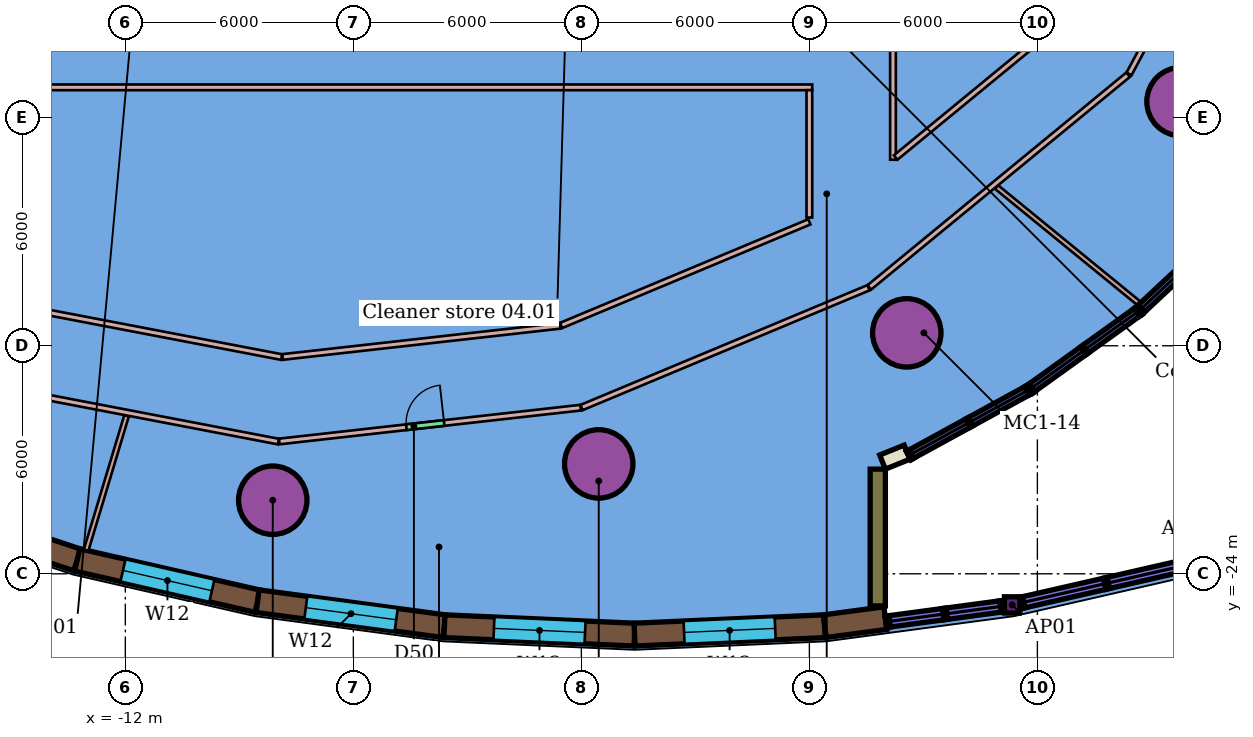
"""IFC4 building model, lengths in metres.
Left out: names, types, materials, properties, quantities, classifications, styles, units other than length and angle.
Written with IfcOpenShell. Run it as: python <this file> out.ifc"""

import sys

from ifc_helpers import new_model, si_unit, direction, frame, frame_2d, origin, origin_2d, place, context, subcontext, project, spatial, rectangle, hollow_circle, i_section, extrude, element, fill, save


model = new_model("IFC4")
c1 = context("Model", 3, precision=1e-05, world=origin(), true_north=direction((0.0, 1.0)))
c2 = subcontext(c1, "Body", "Model", "MODEL_VIEW")
j1 = project(units=[si_unit("LENGTHUNIT", "METRE"), si_unit("PLANEANGLEUNIT", "RADIAN")], contexts=[c1])
p1 = place(None, origin())
s1 = spatial("IfcSite", under=j1, at=p1, CompositionType="ELEMENT")
p2 = place(p1, origin())
s2 = spatial("IfcBuilding", under=s1, at=p2, CompositionType="ELEMENT")
p3 = place(p2, frame((0.0, 0.0, 31.5)))
s3 = spatial("IfcBuildingStorey", under=s2, at=p3, CompositionType="ELEMENT", Elevation=31.5)
for number, where, z_axis, x_axis in (
    (1, (-8.121, -22.064, 0.0), (0.0, 0.0, 1.0), (1.0, 0.0, 0.0)),
    (2, (0.458, -21.108, 0.0), (0.0, 0.0, 1.0), (1.0, 0.0, 0.0)),
    (3, (8.563, -17.66, 0.0), (0.0, 0.0, 1.0), (1.0, 0.0, 0.0)),
    (4, (15.78, -11.576, 0.0), (0.0, 0.0, 1.0), (1.0, 0.0, 0.0)),
):
    element("IfcColumn", number, at=place(p3, frame(where, z_axis=z_axis, x_axis=x_axis)), inside=s3, PredefinedType="COLUMN", context=c2, shape_type="SweptSolid", body=[
        extrude(hollow_circle(Radius=0.9, WallThickness=0.06, at=origin_2d()), origin(), (0.0, 0.0, 1.0), 4.35),
    ])
p4 = place(p3, frame((11.337, -24.819, 0.0), z_axis=(0.0, 0.0, 1.0), x_axis=(1.0, 0.0, 0.0)))
e5 = element("IfcColumn", 5, at=p4, inside=s3, PredefinedType="COLUMN", context=c2, shape_type="SweptSolid", body=[
    extrude(i_section(OverallWidth=0.407, OverallDepth=0.428, WebThickness=0.02, FlangeThickness=0.035, at=origin_2d()), origin(), (0.0, 0.0, 1.0), 4.35),
])
p5 = place(p3, frame((8.2, -13.105, 0.0), z_axis=(0.0, 0.0, 1.0), x_axis=(0.0, 1.0, 0.0)))
e6 = element("IfcWall", 6, at=p5, inside=s3, PredefinedType="PARTITIONING", context=c2, shape_type="SweptSolid", body=[
    extrude(rectangle(XDim=24.23, YDim=0.15, at=frame_2d((12.115, 0.0))), origin(), (0.0, 0.0, 1.0), 3.9),
])
p6 = place(p3, frame((-20.275, -11.2, 0.0), z_axis=(0.0, 0.0, 1.0), x_axis=(1.0, 0.0, 0.0)))
e7 = element("IfcWall", 7, at=p6, inside=s3, PredefinedType="PARTITIONING", context=c2, shape_type="SweptSolid", body=[
    extrude(rectangle(XDim=26.35, YDim=0.15, at=frame_2d((13.175, 0.0))), origin(), (0.0, 0.0, 1.0), 3.9),
])
p7 = place(p3, frame((6.0, -14.626, 0.0), z_axis=(0.0, 0.0, 1.0), x_axis=(0.0, 1.0, 0.0)))
e8 = element("IfcWall", 8, at=p7, inside=s3, PredefinedType="PARTITIONING", context=c2, shape_type="SweptSolid", body=[
    extrude(rectangle(XDim=3.351, YDim=0.15, at=frame_2d((1.676, 0.0))), origin(), (0.0, 0.0, 1.0), 3.9),
])
p8 = place(p3, frame((8.271, -13.047, 0.0), z_axis=(0.0, 0.0, 1.0), x_axis=(0.772561089928, 0.634940439986, 0.0)))
e9 = element("IfcWall", 9, at=p8, inside=s3, PredefinedType="PARTITIONING", context=c2, shape_type="SweptSolid", body=[
    extrude(rectangle(XDim=5.672, YDim=0.15, at=frame_2d((2.836, 0.0))), origin(), (0.0, 0.0, 1.0), 3.9),
])
p9 = place(p3, frame((-15.325, -16.875, 0.0), z_axis=(0.0, 0.0, 1.0), x_axis=(0.982205706766, -0.187808278828, 0.0)))
e10 = element("IfcWall", 10, at=p9, inside=s3, PredefinedType="PARTITIONING", context=c2, shape_type="SweptSolid", body=[
    extrude(rectangle(XDim=7.573, YDim=0.15, at=frame_2d((3.787, 0.0))), origin(), (0.0, 0.0, 1.0), 3.9),
])
p10 = place(p3, frame((-0.533, -17.466, 0.0), z_axis=(0.0, 0.0, 1.0), x_axis=(0.9228124679, 0.38524946345, 0.0)))
e11 = element("IfcWall", 11, at=p10, inside=s3, PredefinedType="PARTITIONING", context=c2, shape_type="SweptSolid", body=[
    extrude(rectangle(XDim=7.08, YDim=0.15, at=frame_2d((3.54, 0.0))), origin(), (0.0, 0.0, 1.0), 3.9),
])
p11 = place(p3, frame((-7.863, -18.295, 0.0), z_axis=(0.0, 0.0, 1.0), x_axis=(0.993762113274, 0.111520680692, 0.0)))
e12 = element("IfcWall", 12, at=p11, inside=s3, PredefinedType="PARTITIONING", context=c2, shape_type="SweptSolid", body=[
    extrude(rectangle(XDim=7.356, YDim=0.15, at=frame_2d((3.678, 0.0))), origin(), (0.0, 0.0, 1.0), 3.9),
])
p12 = place(p3, frame((-13.032, -23.381, 0.0), z_axis=(0.0, 0.0, 1.0), x_axis=(0.288062560414, 0.957611592081, 0.0)))
e13 = element("IfcWall", 13, at=p12, inside=s3, PredefinedType="PARTITIONING", context=c2, shape_type="SweptSolid", body=[
    extrude(rectangle(XDim=3.698, YDim=0.125, at=frame_2d((1.849, 0.0))), origin(), (0.0, 0.0, 1.0), 3.9),
])
p13 = place(p3, frame((-16.06, -18.975, 0.0), z_axis=(0.0, 0.0, 1.0), x_axis=(0.982207009241, -0.187801466976, 0.0)))
e14 = element("IfcWall", 14, at=p13, inside=s3, PredefinedType="PARTITIONING", context=c2, shape_type="SweptSolid", body=[
    extrude(rectangle(XDim=8.234, YDim=0.15, at=frame_2d((4.117, 0.0))), origin(), (0.0, 0.0, 1.0), 3.9),
])
p14 = place(p3, frame((10.927, -13.825, 0.0), z_axis=(0.0, 0.0, 1.0), x_axis=(0.774480098596, -0.632598274483, 0.0)))
e15 = element("IfcWall", 15, at=p14, inside=s3, PredefinedType="PARTITIONING", context=c2, shape_type="SweptSolid", body=[
    extrude(rectangle(XDim=4.866, YDim=0.125, at=frame_2d((2.433, 0.0))), origin(), (0.0, 0.0, 1.0), 3.9),
])
p15 = place(p3, frame((-7.949, -20.518, 0.0), z_axis=(0.0, 0.0, 1.0), x_axis=(0.993764533241, 0.11149911422, 0.0)))
e16 = element("IfcWall", 16, at=p15, inside=s3, PredefinedType="PARTITIONING", context=c2, shape_type="SweptSolid", body=[
    extrude(rectangle(XDim=7.981, YDim=0.15, at=frame_2d((3.991, 0.0))), origin(), (0.0, 0.0, 1.0), 3.9),
])
p16 = place(p15, frame((3.365, 0.0, 0.0)))
e17 = element("IfcOpeningElement", 17, at=p16, cuts=e16, PredefinedType="OPENING", context=c2, shape_type="SweptSolid", body=[
    extrude(rectangle(XDim=1.0, YDim=2.1, at=frame_2d((0.5, 1.05))), frame((0.0, 0.085, 0.0), z_axis=(0.0, -1.0, 0.0), x_axis=(1.0, 0.0, 0.0)), (0.0, 0.0, 1.0), 0.17),
])
p17 = place(p3, frame((0.004, -19.626, 0.0), z_axis=(0.0, 0.0, 1.0), x_axis=(0.922818121352, 0.385235921097, 0.0)))
e18 = element("IfcWall", 18, at=p17, inside=s3, PredefinedType="PARTITIONING", context=c2, shape_type="SweptSolid", body=[
    extrude(rectangle(XDim=8.184, YDim=0.15, at=frame_2d((4.092, 0.0))), origin(), (0.0, 0.0, 1.0), 3.9),
])
p18 = place(p3, frame((7.577, -16.465, 0.0), z_axis=(0.0, 0.0, 1.0), x_axis=(0.772575830308, 0.634922504266, 0.0)))
e19 = element("IfcWall", 19, at=p18, inside=s3, PredefinedType="PARTITIONING", context=c2, shape_type="SweptSolid", body=[
    extrude(rectangle(XDim=8.815, YDim=0.15, at=frame_2d((4.407, 0.0))), origin(), (0.0, 0.0, 1.0), 3.9),
])
p19 = place(p3, frame((14.411, -10.848, 0.0), z_axis=(0.0, 0.0, 1.0), x_axis=(0.470742429837, 0.88227068678, 0.0)))
e20 = element("IfcWall", 20, at=p19, inside=s3, PredefinedType="PARTITIONING", context=c2, shape_type="SweptSolid", body=[
    extrude(rectangle(XDim=9.532, YDim=0.15, at=frame_2d((4.766, 0.0))), origin(), (0.0, 0.0, 1.0), 3.9),
])
p20 = place(p19, frame((4.14, 0.0, 0.0)))
e21 = element("IfcOpeningElement", 21, at=p20, cuts=e20, PredefinedType="OPENING", context=c2, shape_type="SweptSolid", body=[
    extrude(rectangle(XDim=1.0, YDim=2.1, at=frame_2d((0.5, 1.05))), frame((0.0, 0.085, 0.0), z_axis=(0.0, -1.0, 0.0), x_axis=(1.0, 0.0, 0.0)), (0.0, 0.0, 1.0), 0.17),
])
p21 = place(p3, frame((-17.755, -22.144, 0.0), z_axis=(0.0, 0.0, 1.0), x_axis=(0.94901810672, -0.315221561949, 0.0)))
e22 = element("IfcWall", 22, at=p21, inside=s3, PredefinedType="SOLIDWALL", context=c2, shape_type="SweptSolid", body=[
    extrude(rectangle(XDim=4.732, YDim=0.6, at=frame_2d((2.366, 0.0))), origin(), (0.0, 0.0, 1.0), 4.35),
])
p22 = place(p21, frame((1.166, 0.0, 0.9)))
e23 = element("IfcOpeningElement", 23, at=p22, cuts=e22, PredefinedType="OPENING", context=c2, shape_type="SweptSolid", body=[
    extrude(rectangle(XDim=2.4, YDim=2.4, at=frame_2d((1.2, 1.2))), frame((0.0, 0.31, 0.0), z_axis=(0.0, -1.0, 0.0), x_axis=(1.0, 0.0, 0.0)), (0.0, 0.0, 1.0), 0.62),
])
p23 = place(p3, frame((-13.264, -23.635, 0.0), z_axis=(0.0, 0.0, 1.0), x_axis=(0.97483982486, -0.222906518224, 0.0)))
e24 = element("IfcWall", 24, at=p23, inside=s3, PredefinedType="SOLIDWALL", context=c2, shape_type="SweptSolid", body=[
    extrude(rectangle(XDim=4.867, YDim=0.6, at=frame_2d((2.434, 0.0))), origin(), (0.0, 0.0, 1.0), 4.35),
])
p24 = place(p23, frame((1.234, 0.0, 0.9)))
e25 = element("IfcOpeningElement", 25, at=p24, cuts=e24, PredefinedType="OPENING", context=c2, shape_type="SweptSolid", body=[
    extrude(rectangle(XDim=2.4, YDim=2.4, at=frame_2d((1.2, 1.2))), frame((0.0, 0.31, 0.0), z_axis=(0.0, -1.0, 0.0), x_axis=(1.0, 0.0, 0.0)), (0.0, 0.0, 1.0), 0.62),
])
p25 = place(p3, frame((-8.519, -24.72, 0.0), z_axis=(0.0, 0.0, 1.0), x_axis=(0.991143444913, -0.132795600853, 0.0)))
e26 = element("IfcWall", 26, at=p25, inside=s3, PredefinedType="SOLIDWALL", context=c2, shape_type="SweptSolid", body=[
    extrude(rectangle(XDim=4.96, YDim=0.6, at=frame_2d((2.48, 0.0))), origin(), (0.0, 0.0, 1.0), 4.35),
])
p26 = place(p25, frame((1.28, 0.0, 0.9)))
e27 = element("IfcOpeningElement", 27, at=p26, cuts=e26, PredefinedType="OPENING", context=c2, shape_type="SweptSolid", body=[
    extrude(rectangle(XDim=2.4, YDim=2.4, at=frame_2d((1.2, 1.2))), frame((0.0, 0.31, 0.0), z_axis=(0.0, -1.0, 0.0), x_axis=(1.0, 0.0, 0.0)), (0.0, 0.0, 1.0), 0.62),
])
p27 = place(p3, frame((-3.603, -25.379, 0.0), z_axis=(0.0, 0.0, 1.0), x_axis=(0.999026213515, -0.044120570136, 0.0)))
e28 = element("IfcWall", 28, at=p27, inside=s3, PredefinedType="SOLIDWALL", context=c2, shape_type="SweptSolid", body=[
    extrude(rectangle(XDim=5.008, YDim=0.6, at=frame_2d((2.504, 0.0))), origin(), (0.0, 0.0, 1.0), 4.35),
])
p28 = place(p27, frame((1.304, 0.0, 0.9)))
e29 = element("IfcOpeningElement", 29, at=p28, cuts=e28, PredefinedType="OPENING", context=c2, shape_type="SweptSolid", body=[
    extrude(rectangle(XDim=2.4, YDim=2.4, at=frame_2d((1.2, 1.2))), frame((0.0, 0.31, 0.0), z_axis=(0.0, -1.0, 0.0), x_axis=(1.0, 0.0, 0.0)), (0.0, 0.0, 1.0), 0.62),
])
p29 = place(p3, frame((1.4, -25.6, 0.0), z_axis=(0.0, 0.0, 1.0), x_axis=(0.99902630841, 0.044118421369, 0.0)))
e30 = element("IfcWall", 30, at=p29, inside=s3, PredefinedType="SOLIDWALL", context=c2, shape_type="SweptSolid", body=[
    extrude(rectangle(XDim=5.008, YDim=0.6, at=frame_2d((2.504, 0.0))), origin(), (0.0, 0.0, 1.0), 4.35),
])
p30 = place(p29, frame((1.304, 0.0, 0.9)))
e31 = element("IfcOpeningElement", 31, at=p30, cuts=e30, PredefinedType="OPENING", context=c2, shape_type="SweptSolid", body=[
    extrude(rectangle(XDim=2.4, YDim=2.4, at=frame_2d((1.2, 1.2))), frame((0.0, 0.31, 0.0), z_axis=(0.0, -1.0, 0.0), x_axis=(1.0, 0.0, 0.0)), (0.0, 0.0, 1.0), 0.62),
])
p31 = place(p3, frame((6.403, -25.379, 0.0), z_axis=(0.0, 0.0, 1.0), x_axis=(0.991131029833, 0.132888230112, 0.0)))
e32 = element("IfcWall", 32, at=p31, inside=s3, PredefinedType="SOLIDWALL", context=c2, shape_type="SweptSolid", body=[
    extrude(rectangle(XDim=1.611, YDim=0.6, at=frame_2d((0.806, 0.0))), origin(), (0.0, 0.0, 1.0), 4.35),
])
p32 = place(p3, frame((8.571, -20.8, 0.0), z_axis=(0.0, 0.0, 1.0), x_axis=(-0.927141159757, -0.374712249444, 0.0)))
e33 = element("IfcWall", 33, at=p32, inside=s3, PredefinedType="SOLIDWALL", context=c2, shape_type="SweptSolid", body=[
    extrude(rectangle(XDim=0.697, YDim=0.4, at=frame_2d((0.348, 0.0))), origin(), (0.0, 0.0, 1.0), 3.862),
])
p33 = place(p3, frame((7.8, -21.246, 0.0), z_axis=(0.0, 0.0, 1.0), x_axis=(0.0, -1.0, 0.0)))
e34 = element("IfcWall", 34, at=p33, inside=s3, PredefinedType="SOLIDWALL", context=c2, shape_type="SweptSolid", body=[
    extrude(rectangle(XDim=3.599, YDim=0.4, at=frame_2d((1.8, 0.0))), origin(), (0.0, 0.0, 1.0), 4.35),
])
p34 = place(p16, origin())
e35 = element("IfcDoor", 35, at=p34, inside=s3, OperationType="SINGLE_SWING_RIGHT", PredefinedType="DOOR", context=c2, shape_type="SweptSolid", body=[
    extrude(rectangle(XDim=1.0, YDim=2.1, at=frame_2d((0.5, 1.05))), frame((0.0, 0.025, 0.0), z_axis=(0.0, -1.0, 0.0), x_axis=(1.0, 0.0, 0.0)), (0.0, 0.0, 1.0), 0.05),
])
fill(e17, e35)
p35 = place(p24, origin())
e36 = element("IfcWindow", 36, at=p35, inside=s3, PartitioningType="SINGLE_PANEL", PredefinedType="WINDOW", context=c2, shape_type="SweptSolid", body=[
    extrude(rectangle(XDim=2.4, YDim=2.4, at=frame_2d((1.2, 1.2))), frame((0.0, 0.03, 0.0), z_axis=(0.0, -1.0, 0.0), x_axis=(1.0, 0.0, 0.0)), (0.0, 0.0, 1.0), 0.06),
])
fill(e25, e36)
p36 = place(p26, origin())
e37 = element("IfcWindow", 37, at=p36, inside=s3, PartitioningType="SINGLE_PANEL", PredefinedType="WINDOW", context=c2, shape_type="SweptSolid", body=[
    extrude(rectangle(XDim=2.4, YDim=2.4, at=frame_2d((1.2, 1.2))), frame((0.0, 0.03, 0.0), z_axis=(0.0, -1.0, 0.0), x_axis=(1.0, 0.0, 0.0)), (0.0, 0.0, 1.0), 0.06),
])
fill(e27, e37)
p37 = place(p28, origin())
e38 = element("IfcWindow", 38, at=p37, inside=s3, PartitioningType="SINGLE_PANEL", PredefinedType="WINDOW", context=c2, shape_type="SweptSolid", body=[
    extrude(rectangle(XDim=2.4, YDim=2.4, at=frame_2d((1.2, 1.2))), frame((0.0, 0.03, 0.0), z_axis=(0.0, -1.0, 0.0), x_axis=(1.0, 0.0, 0.0)), (0.0, 0.0, 1.0), 0.06),
])
fill(e29, e38)
p38 = place(p30, origin())
e39 = element("IfcWindow", 39, at=p38, inside=s3, PartitioningType="SINGLE_PANEL", PredefinedType="WINDOW", context=c2, shape_type="SweptSolid", body=[
    extrude(rectangle(XDim=2.4, YDim=2.4, at=frame_2d((1.2, 1.2))), frame((0.0, 0.03, 0.0), z_axis=(0.0, -1.0, 0.0), x_axis=(1.0, 0.0, 0.0)), (0.0, 0.0, 1.0), 0.06),
])
fill(e31, e39)
save(model, sys.argv[1])
